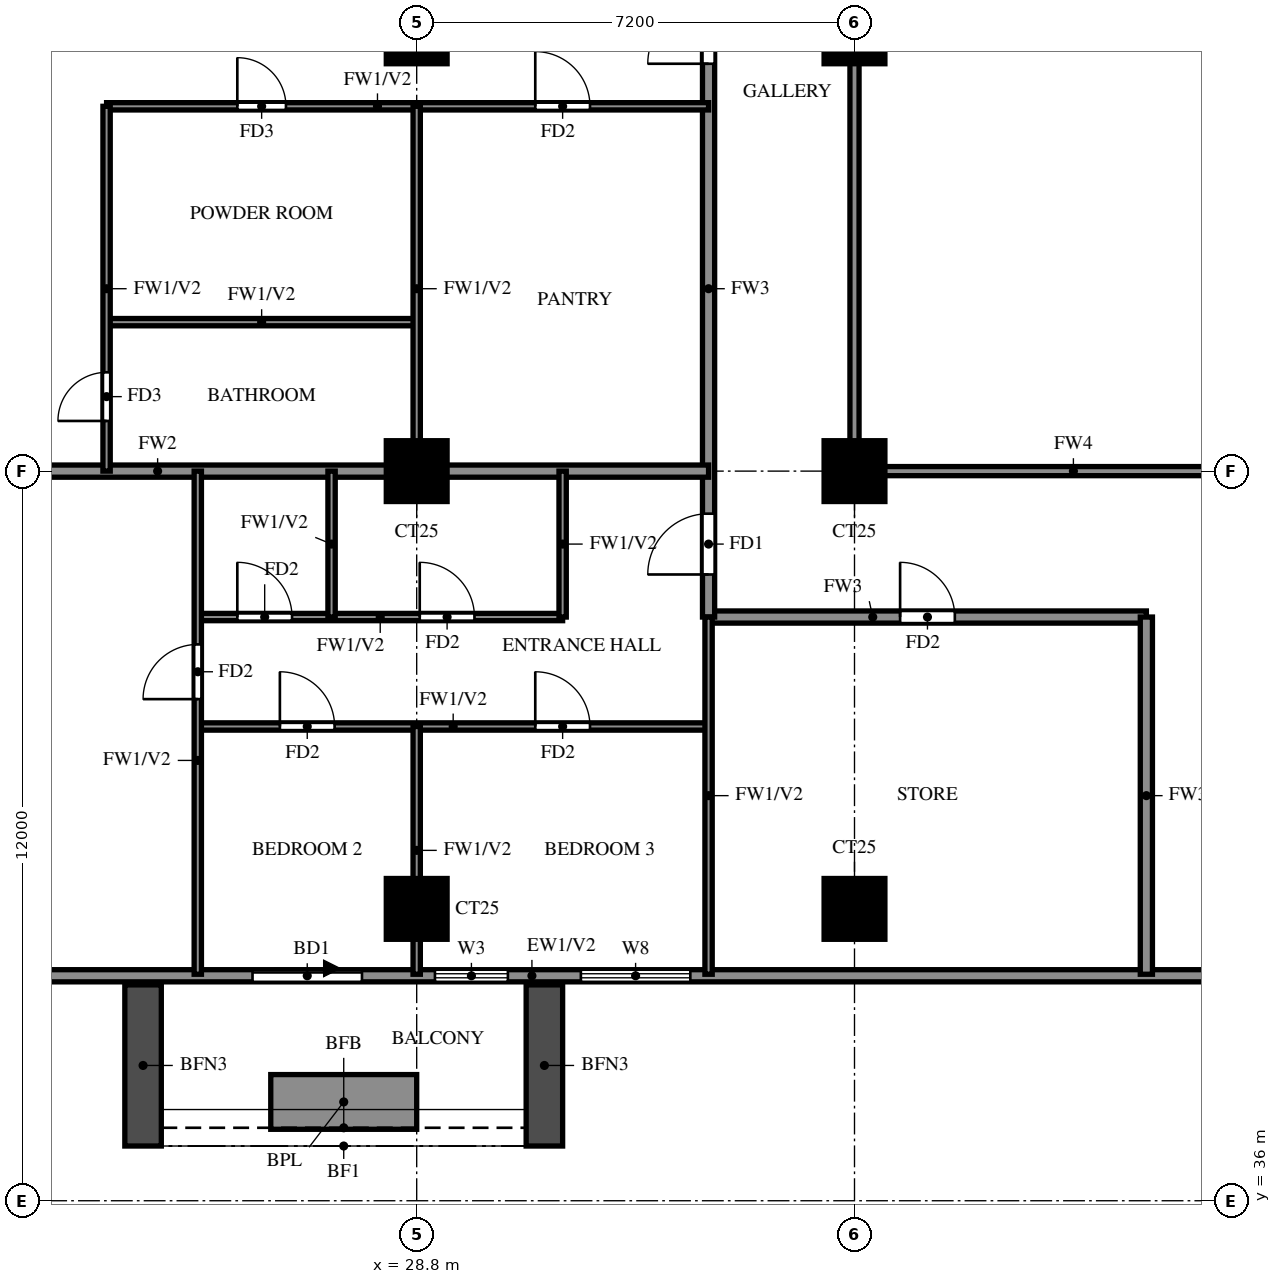
"""IFC4 building model, lengths in metres.
Left out: names, types, materials, properties, quantities, classifications, styles, units other than length and angle.
Written with IfcOpenShell. Run it as: python <this file> out.ifc"""

import sys

from ifc_helpers import new_model, si_unit, direction, frame, frame_2d, origin, origin_2d, place, context, subcontext, project, spatial, rectangle, extrude, source, transform, mapped, element, fill, save


model = new_model("IFC4")
c1 = context("Model", 3, precision=1e-05, world=origin(), true_north=direction((0.0, 1.0)))
c2 = subcontext(c1, "Body", "Model", "MODEL_VIEW")
j1 = project(units=[si_unit("LENGTHUNIT", "METRE"), si_unit("PLANEANGLEUNIT", "RADIAN")], contexts=[c1])
p1 = place(None, origin())
s1 = spatial("IfcSite", under=j1, at=p1, CompositionType="ELEMENT")
p2 = place(p1, origin())
s2 = spatial("IfcBuilding", under=s1, at=p2, CompositionType="ELEMENT")
p3 = place(p2, frame((0.0, 0.0, 164.0)))
s3 = spatial("IfcBuildingStorey", under=s2, at=p3, CompositionType="ELEMENT", Elevation=164.0)
m1 = source(origin(), c2, "Body", "SweptSolid", [
    extrude(rectangle(XDim=1.0, YDim=1.0, at=origin_2d()), origin(), (0.0, 0.0, 1.0), 3.2),
])
for number, where, z_axis, x_axis in (
    (1, (28.8, 40.8, 0.0), (0.0, 0.0, 1.0), (1.0, 0.0, 0.0)),
    (2, (36.0, 40.8, 0.0), (0.0, 0.0, 1.0), (1.0, 0.0, 0.0)),
    (3, (28.8, 48.0, 0.0), (0.0, 0.0, 1.0), (1.0, 0.0, 0.0)),
    (4, (36.0, 48.0, 0.0), (0.0, 0.0, 1.0), (1.0, 0.0, 0.0)),
    (5, (28.8, 55.2, 0.0), (0.0, 0.0, 1.0), (1.0, 0.0, 0.0)),
    (6, (36.0, 55.2, 0.0), (0.0, 0.0, 1.0), (1.0, 0.0, 0.0)),
):
    element("IfcColumn", number, at=place(p3, frame(where, z_axis=z_axis, x_axis=x_axis)), inside=s3, PredefinedType="COLUMN", context=c2, shape_type="MappedRepresentation", body=[
        mapped(m1, transform((0.0, 0.0, 0.0))),
    ])
p4 = place(p3, frame((18.2, 39.7, 0.0), z_axis=(0.0, 0.0, 1.0), x_axis=(1.0, 0.0, 0.0)))
e7 = element("IfcWall", 7, at=p4, inside=s3, PredefinedType="SOLIDWALL", context=c2, shape_type="SweptSolid", body=[
    extrude(rectangle(XDim=23.8, YDim=0.2, at=frame_2d((11.9, 0.0))), origin(), (0.0, 0.0, 1.0), 3.2),
])
p5 = place(p4, frame((7.9, 0.0, 0.0)))
e8 = element("IfcOpeningElement", 8, at=p5, cuts=e7, PredefinedType="OPENING", context=c2, shape_type="SweptSolid", body=[
    extrude(rectangle(XDim=1.8, YDim=2.4, at=frame_2d((0.9, 1.2))), frame((0.0, 0.11, 0.0), z_axis=(0.0, -1.0, 0.0), x_axis=(1.0, 0.0, 0.0)), (0.0, 0.0, 1.0), 0.22),
])
p6 = place(p4, frame((1.8, 0.0, 0.6)))
e9 = element("IfcOpeningElement", 9, at=p6, cuts=e7, PredefinedType="OPENING", context=c2, shape_type="SweptSolid", body=[
    extrude(rectangle(XDim=2.4, YDim=2.4, at=frame_2d((1.2, 1.2))), frame((0.0, 0.11, 0.0), z_axis=(0.0, -1.0, 0.0), x_axis=(1.0, 0.0, 0.0)), (0.0, 0.0, 1.0), 0.22),
])
p7 = place(p4, frame((10.9, 0.0, 0.6)))
e10 = element("IfcOpeningElement", 10, at=p7, cuts=e7, PredefinedType="OPENING", context=c2, shape_type="SweptSolid", body=[
    extrude(rectangle(XDim=1.2, YDim=2.4, at=frame_2d((0.6, 1.2))), frame((0.0, 0.11, 0.0), z_axis=(0.0, -1.0, 0.0), x_axis=(1.0, 0.0, 0.0)), (0.0, 0.0, 1.0), 0.22),
])
p8 = place(p4, frame((13.3, 0.0, 0.6)))
e11 = element("IfcOpeningElement", 11, at=p8, cuts=e7, PredefinedType="OPENING", context=c2, shape_type="SweptSolid", body=[
    extrude(rectangle(XDim=1.8, YDim=2.4, at=frame_2d((0.9, 1.2))), frame((0.0, 0.11, 0.0), z_axis=(0.0, -1.0, 0.0), x_axis=(1.0, 0.0, 0.0)), (0.0, 0.0, 1.0), 0.22),
])
for number, where, z_axis, x_axis in (
    (12, (24.3, 39.55, 0.0), (0.0, 0.0, 1.0), (0.0, -1.0, 0.0)),
    (13, (30.9, 39.55, 0.0), (0.0, 0.0, 1.0), (0.0, -1.0, 0.0)),
):
    element("IfcWall", number, at=place(p3, frame(where, z_axis=z_axis, x_axis=x_axis)), inside=s3, PredefinedType="SOLIDWALL", context=c2, shape_type="SweptSolid", body=[
        extrude(rectangle(XDim=2.65, YDim=0.6, at=frame_2d((1.325, 0.0))), origin(), (0.0, 0.0, 1.0), 2.85),
    ])
p9 = place(p3, frame((26.4, 37.625, 0.0), z_axis=(0.0, 0.0, 1.0), x_axis=(1.0, 0.0, 0.0)))
e14 = element("IfcWall", 14, at=p9, inside=s3, PredefinedType="SOLIDWALL", context=c2, shape_type="SweptSolid", body=[
    extrude(rectangle(XDim=2.4, YDim=0.9, at=frame_2d((1.2, 0.0))), origin(), (0.0, 0.0, 1.0), 0.9),
])
p10 = place(p3, frame((33.6, 45.6, 0.0), z_axis=(0.0, 0.0, 1.0), x_axis=(1.0, 0.0, 0.0)))
e15 = element("IfcWall", 15, at=p10, inside=s3, PredefinedType="SOLIDWALL", context=c2, shape_type="SweptSolid", body=[
    extrude(rectangle(XDim=7.2, YDim=0.2, at=frame_2d((3.6, 0.0))), origin(), (0.0, 0.0, 1.0), 3.2),
])
p11 = place(p10, frame((3.15, 0.0, 0.0)))
e16 = element("IfcOpeningElement", 16, at=p11, cuts=e15, PredefinedType="OPENING", context=c2, shape_type="SweptSolid", body=[
    extrude(rectangle(XDim=0.9, YDim=2.1, at=frame_2d((0.45, 1.05))), frame((0.0, 0.11, 0.0), z_axis=(0.0, -1.0, 0.0), x_axis=(1.0, 0.0, 0.0)), (0.0, 0.0, 1.0), 0.22),
])
p12 = place(p3, frame((33.6, 45.6, 0.0), z_axis=(0.0, 0.0, 1.0), x_axis=(0.0, 1.0, 0.0)))
e17 = element("IfcWall", 17, at=p12, inside=s3, PredefinedType="SOLIDWALL", context=c2, shape_type="SweptSolid", body=[
    extrude(rectangle(XDim=10.8, YDim=0.2, at=frame_2d((5.4, 0.0))), origin(), (0.0, 0.0, 1.0), 3.2),
])
p13 = place(p12, frame((0.7, 0.0, 0.0)))
e18 = element("IfcOpeningElement", 18, at=p13, cuts=e17, PredefinedType="OPENING", context=c2, shape_type="SweptSolid", body=[
    extrude(rectangle(XDim=1.0, YDim=2.1, at=frame_2d((0.5, 1.05))), frame((0.0, 0.11, 0.0), z_axis=(0.0, -1.0, 0.0), x_axis=(1.0, 0.0, 0.0)), (0.0, 0.0, 1.0), 0.22),
])
p14 = place(p12, frame((9.1, 0.0, 0.0)))
e19 = element("IfcOpeningElement", 19, at=p14, cuts=e17, PredefinedType="OPENING", context=c2, shape_type="SweptSolid", body=[
    extrude(rectangle(XDim=1.0, YDim=2.1, at=frame_2d((0.5, 1.05))), frame((0.0, 0.11, 0.0), z_axis=(0.0, -1.0, 0.0), x_axis=(1.0, 0.0, 0.0)), (0.0, 0.0, 1.0), 0.22),
])
p15 = place(p3, frame((40.8, 39.725, 0.0), z_axis=(0.0, 0.0, 1.0), x_axis=(0.0, 1.0, 0.0)))
e20 = element("IfcWall", 20, at=p15, inside=s3, PredefinedType="SOLIDWALL", context=c2, shape_type="SweptSolid", body=[
    extrude(rectangle(XDim=5.875, YDim=0.2, at=frame_2d((2.938, 0.0))), origin(), (0.0, 0.0, 1.0), 3.2),
])
p16 = place(p3, frame((14.525, 48.0, 0.0), z_axis=(0.0, 0.0, 1.0), x_axis=(1.0, 0.0, 0.0)))
e21 = element("IfcWall", 21, at=p16, inside=s3, PredefinedType="SOLIDWALL", context=c2, shape_type="SweptSolid", body=[
    extrude(rectangle(XDim=19.075, YDim=0.2, at=frame_2d((9.538, 0.0))), origin(), (0.0, 0.0, 1.0), 3.2),
])
p17 = place(p3, frame((25.2, 43.8, 0.0), z_axis=(0.0, 0.0, 1.0), x_axis=(1.0, 0.0, 0.0)))
e22 = element("IfcWall", 22, at=p17, inside=s3, PredefinedType="PARTITIONING", context=c2, shape_type="SweptSolid", body=[
    extrude(rectangle(XDim=8.4, YDim=0.12, at=frame_2d((4.2, 0.0))), origin(), (0.0, 0.0, 1.0), 3.2),
])
p18 = place(p17, frame((1.35, 0.0, 0.0)))
e23 = element("IfcOpeningElement", 23, at=p18, cuts=e22, PredefinedType="OPENING", context=c2, shape_type="SweptSolid", body=[
    extrude(rectangle(XDim=0.9, YDim=2.1, at=frame_2d((0.45, 1.05))), frame((0.0, 0.07, 0.0), z_axis=(0.0, -1.0, 0.0), x_axis=(1.0, 0.0, 0.0)), (0.0, 0.0, 1.0), 0.14),
])
p19 = place(p17, frame((5.55, 0.0, 0.0)))
e24 = element("IfcOpeningElement", 24, at=p19, cuts=e22, PredefinedType="OPENING", context=c2, shape_type="SweptSolid", body=[
    extrude(rectangle(XDim=0.9, YDim=2.1, at=frame_2d((0.45, 1.05))), frame((0.0, 0.07, 0.0), z_axis=(0.0, -1.0, 0.0), x_axis=(1.0, 0.0, 0.0)), (0.0, 0.0, 1.0), 0.14),
])
p20 = place(p3, frame((25.2, 45.6, 0.0), z_axis=(0.0, 0.0, 1.0), x_axis=(1.0, 0.0, 0.0)))
e25 = element("IfcWall", 25, at=p20, inside=s3, PredefinedType="PARTITIONING", context=c2, shape_type="SweptSolid", body=[
    extrude(rectangle(XDim=6.0, YDim=0.12, at=frame_2d((3.0, 0.0))), origin(), (0.0, 0.0, 1.0), 3.2),
])
p21 = place(p20, frame((0.65, 0.0, 0.0)))
e26 = element("IfcOpeningElement", 26, at=p21, cuts=e25, PredefinedType="OPENING", context=c2, shape_type="SweptSolid", body=[
    extrude(rectangle(XDim=0.9, YDim=2.1, at=frame_2d((0.45, 1.05))), frame((0.0, 0.07, 0.0), z_axis=(0.0, -1.0, 0.0), x_axis=(1.0, 0.0, 0.0)), (0.0, 0.0, 1.0), 0.14),
])
p22 = place(p20, frame((3.65, 0.0, 0.0)))
e27 = element("IfcOpeningElement", 27, at=p22, cuts=e25, PredefinedType="OPENING", context=c2, shape_type="SweptSolid", body=[
    extrude(rectangle(XDim=0.9, YDim=2.1, at=frame_2d((0.45, 1.05))), frame((0.0, 0.07, 0.0), z_axis=(0.0, -1.0, 0.0), x_axis=(1.0, 0.0, 0.0)), (0.0, 0.0, 1.0), 0.14),
])
p23 = place(p3, frame((23.7, 50.45, 0.0), z_axis=(0.0, 0.0, 1.0), x_axis=(1.0, 0.0, 0.0)))
e28 = element("IfcWall", 28, at=p23, inside=s3, PredefinedType="PARTITIONING", context=c2, shape_type="SweptSolid", body=[
    extrude(rectangle(XDim=5.1, YDim=0.12, at=frame_2d((2.55, 0.0))), origin(), (0.0, 0.0, 1.0), 3.2),
])
p24 = place(p3, frame((23.7, 54.0, 0.0), z_axis=(0.0, 0.0, 1.0), x_axis=(1.0, 0.0, 0.0)))
e29 = element("IfcWall", 29, at=p24, inside=s3, PredefinedType="PARTITIONING", context=c2, shape_type="SweptSolid", body=[
    extrude(rectangle(XDim=9.9, YDim=0.12, at=frame_2d((4.95, 0.0))), origin(), (0.0, 0.0, 1.0), 3.2),
])
p25 = place(p24, frame((2.15, 0.0, 0.0)))
e30 = element("IfcOpeningElement", 30, at=p25, cuts=e29, PredefinedType="OPENING", context=c2, shape_type="SweptSolid", body=[
    extrude(rectangle(XDim=0.8, YDim=2.1, at=frame_2d((0.4, 1.05))), frame((0.0, 0.07, 0.0), z_axis=(0.0, -1.0, 0.0), x_axis=(1.0, 0.0, 0.0)), (0.0, 0.0, 1.0), 0.14),
])
p26 = place(p24, frame((7.05, 0.0, 0.0)))
e31 = element("IfcOpeningElement", 31, at=p26, cuts=e29, PredefinedType="OPENING", context=c2, shape_type="SweptSolid", body=[
    extrude(rectangle(XDim=0.9, YDim=2.1, at=frame_2d((0.45, 1.05))), frame((0.0, 0.07, 0.0), z_axis=(0.0, -1.0, 0.0), x_axis=(1.0, 0.0, 0.0)), (0.0, 0.0, 1.0), 0.14),
])
p27 = place(p3, frame((23.7, 48.0, 0.0), z_axis=(0.0, 0.0, 1.0), x_axis=(0.0, 1.0, 0.0)))
e32 = element("IfcWall", 32, at=p27, inside=s3, PredefinedType="PARTITIONING", context=c2, shape_type="SweptSolid", body=[
    extrude(rectangle(XDim=6.0, YDim=0.12, at=frame_2d((3.0, 0.0))), origin(), (0.0, 0.0, 1.0), 3.2),
])
p28 = place(p27, frame((0.825, 0.0, 0.0)))
e33 = element("IfcOpeningElement", 33, at=p28, cuts=e32, PredefinedType="OPENING", context=c2, shape_type="SweptSolid", body=[
    extrude(rectangle(XDim=0.8, YDim=2.1, at=frame_2d((0.4, 1.05))), frame((0.0, 0.07, 0.0), z_axis=(0.0, -1.0, 0.0), x_axis=(1.0, 0.0, 0.0)), (0.0, 0.0, 1.0), 0.14),
])
p29 = place(p3, frame((25.2, 39.725, 0.0), z_axis=(0.0, 0.0, 1.0), x_axis=(0.0, 1.0, 0.0)))
e34 = element("IfcWall", 34, at=p29, inside=s3, PredefinedType="PARTITIONING", context=c2, shape_type="SweptSolid", body=[
    extrude(rectangle(XDim=8.275, YDim=0.12, at=frame_2d((4.137, 0.0))), origin(), (0.0, 0.0, 1.0), 3.2),
])
p30 = place(p29, frame((4.525, 0.0, 0.0)))
e35 = element("IfcOpeningElement", 35, at=p30, cuts=e34, PredefinedType="OPENING", context=c2, shape_type="SweptSolid", body=[
    extrude(rectangle(XDim=0.9, YDim=2.1, at=frame_2d((0.45, 1.05))), frame((0.0, 0.07, 0.0), z_axis=(0.0, -1.0, 0.0), x_axis=(1.0, 0.0, 0.0)), (0.0, 0.0, 1.0), 0.14),
])
p31 = place(p3, frame((27.4, 45.6, 0.0), z_axis=(0.0, 0.0, 1.0), x_axis=(0.0, 1.0, 0.0)))
e36 = element("IfcWall", 36, at=p31, inside=s3, PredefinedType="PARTITIONING", context=c2, shape_type="SweptSolid", body=[
    extrude(rectangle(XDim=2.4, YDim=0.12, at=frame_2d((1.2, 0.0))), origin(), (0.0, 0.0, 1.0), 3.2),
])
p32 = place(p3, frame((28.8, 39.725, 0.0), z_axis=(0.0, 0.0, 1.0), x_axis=(0.0, 1.0, 0.0)))
e37 = element("IfcWall", 37, at=p32, inside=s3, PredefinedType="PARTITIONING", context=c2, shape_type="SweptSolid", body=[
    extrude(rectangle(XDim=4.075, YDim=0.12, at=frame_2d((2.038, 0.0))), origin(), (0.0, 0.0, 1.0), 3.2),
])
p33 = place(p3, frame((28.8, 48.0, 0.0), z_axis=(0.0, 0.0, 1.0), x_axis=(0.0, 1.0, 0.0)))
e38 = element("IfcWall", 38, at=p33, inside=s3, PredefinedType="PARTITIONING", context=c2, shape_type="SweptSolid", body=[
    extrude(rectangle(XDim=6.0, YDim=0.12, at=frame_2d((3.0, 0.0))), origin(), (0.0, 0.0, 1.0), 3.2),
])
p34 = place(p3, frame((31.2, 45.6, 0.0), z_axis=(0.0, 0.0, 1.0), x_axis=(0.0, 1.0, 0.0)))
e39 = element("IfcWall", 39, at=p34, inside=s3, PredefinedType="PARTITIONING", context=c2, shape_type="SweptSolid", body=[
    extrude(rectangle(XDim=2.4, YDim=0.12, at=frame_2d((1.2, 0.0))), origin(), (0.0, 0.0, 1.0), 3.2),
])
p35 = place(p3, frame((33.6, 39.725, 0.0), z_axis=(0.0, 0.0, 1.0), x_axis=(0.0, 1.0, 0.0)))
e40 = element("IfcWall", 40, at=p35, inside=s3, PredefinedType="PARTITIONING", context=c2, shape_type="SweptSolid", body=[
    extrude(rectangle(XDim=5.875, YDim=0.12, at=frame_2d((2.938, 0.0))), origin(), (0.0, 0.0, 1.0), 3.2),
])
p36 = place(p3, frame((36.0, 48.0, 0.0), z_axis=(0.0, 0.0, 1.0), x_axis=(1.0, 0.0, 0.0)))
e41 = element("IfcWall", 41, at=p36, inside=s3, PredefinedType="SOLIDWALL", context=c2, shape_type="SweptSolid", body=[
    extrude(rectangle(XDim=7.2, YDim=0.15, at=frame_2d((3.6, 0.0))), origin(), (0.0, 0.0, 1.0), 2.3),
])
p37 = place(p3, frame((36.0, 48.0, 0.0), z_axis=(0.0, 0.0, 1.0), x_axis=(0.0, 1.0, 0.0)))
e42 = element("IfcWall", 42, at=p37, inside=s3, PredefinedType="SOLIDWALL", context=c2, shape_type="SweptSolid", body=[
    extrude(rectangle(XDim=14.4, YDim=0.15, at=frame_2d((7.2, 0.0))), origin(), (0.0, 0.0, 1.0), 2.3),
])
p38 = place(p5, origin())
e43 = element("IfcDoor", 43, at=p38, inside=s3, OperationType="DOUBLE_DOOR_SLIDING", PredefinedType="DOOR", context=c2, shape_type="SweptSolid", body=[
    extrude(rectangle(XDim=1.8, YDim=2.4, at=frame_2d((0.9, 1.2))), frame((0.0, 0.025, 0.0), z_axis=(0.0, -1.0, 0.0), x_axis=(1.0, 0.0, 0.0)), (0.0, 0.0, 1.0), 0.05),
])
fill(e8, e43)
p39 = place(p7, origin())
e44 = element("IfcWindow", 44, at=p39, inside=s3, PartitioningType="SINGLE_PANEL", PredefinedType="WINDOW", context=c2, shape_type="SweptSolid", body=[
    extrude(rectangle(XDim=1.2, YDim=2.4, at=frame_2d((0.6, 1.2))), frame((0.0, 0.03, 0.0), z_axis=(0.0, -1.0, 0.0), x_axis=(1.0, 0.0, 0.0)), (0.0, 0.0, 1.0), 0.06),
])
fill(e10, e44)
p40 = place(p8, origin())
e45 = element("IfcWindow", 45, at=p40, inside=s3, PartitioningType="DOUBLE_PANEL_VERTICAL", PredefinedType="WINDOW", context=c2, shape_type="SweptSolid", body=[
    extrude(rectangle(XDim=1.8, YDim=2.4, at=frame_2d((0.9, 1.2))), frame((0.0, 0.03, 0.0), z_axis=(0.0, -1.0, 0.0), x_axis=(1.0, 0.0, 0.0)), (0.0, 0.0, 1.0), 0.06),
])
fill(e11, e45)
p41 = place(p13, origin())
e46 = element("IfcDoor", 46, at=p41, inside=s3, OperationType="SINGLE_SWING_LEFT", PredefinedType="DOOR", context=c2, shape_type="SweptSolid", body=[
    extrude(rectangle(XDim=1.0, YDim=2.1, at=frame_2d((0.5, 1.05))), frame((0.0, 0.025, 0.0), z_axis=(0.0, -1.0, 0.0), x_axis=(1.0, 0.0, 0.0)), (0.0, 0.0, 1.0), 0.05),
])
fill(e18, e46)
p42 = place(p30, origin())
e47 = element("IfcDoor", 47, at=p42, inside=s3, OperationType="SINGLE_SWING_LEFT", PredefinedType="DOOR", context=c2, shape_type="SweptSolid", body=[
    extrude(rectangle(XDim=0.9, YDim=2.1, at=frame_2d((0.45, 1.05))), frame((0.0, 0.025, 0.0), z_axis=(0.0, -1.0, 0.0), x_axis=(1.0, 0.0, 0.0)), (0.0, 0.0, 1.0), 0.05),
])
fill(e35, e47)
p43 = place(p18, origin())
e48 = element("IfcDoor", 48, at=p43, inside=s3, OperationType="SINGLE_SWING_RIGHT", PredefinedType="DOOR", context=c2, shape_type="SweptSolid", body=[
    extrude(rectangle(XDim=0.9, YDim=2.1, at=frame_2d((0.45, 1.05))), frame((0.0, 0.025, 0.0), z_axis=(0.0, -1.0, 0.0), x_axis=(1.0, 0.0, 0.0)), (0.0, 0.0, 1.0), 0.05),
])
fill(e23, e48)
p44 = place(p19, origin())
e49 = element("IfcDoor", 49, at=p44, inside=s3, OperationType="SINGLE_SWING_LEFT", PredefinedType="DOOR", context=c2, shape_type="SweptSolid", body=[
    extrude(rectangle(XDim=0.9, YDim=2.1, at=frame_2d((0.45, 1.05))), frame((0.0, 0.025, 0.0), z_axis=(0.0, -1.0, 0.0), x_axis=(1.0, 0.0, 0.0)), (0.0, 0.0, 1.0), 0.05),
])
fill(e24, e49)
p45 = place(p21, origin())
e50 = element("IfcDoor", 50, at=p45, inside=s3, OperationType="SINGLE_SWING_LEFT", PredefinedType="DOOR", context=c2, shape_type="SweptSolid", body=[
    extrude(rectangle(XDim=0.9, YDim=2.1, at=frame_2d((0.45, 1.05))), frame((0.0, 0.025, 0.0), z_axis=(0.0, -1.0, 0.0), x_axis=(1.0, 0.0, 0.0)), (0.0, 0.0, 1.0), 0.05),
])
fill(e26, e50)
p46 = place(p22, origin())
e51 = element("IfcDoor", 51, at=p46, inside=s3, OperationType="SINGLE_SWING_RIGHT", PredefinedType="DOOR", context=c2, shape_type="SweptSolid", body=[
    extrude(rectangle(XDim=0.9, YDim=2.1, at=frame_2d((0.45, 1.05))), frame((0.0, 0.025, 0.0), z_axis=(0.0, -1.0, 0.0), x_axis=(1.0, 0.0, 0.0)), (0.0, 0.0, 1.0), 0.05),
])
fill(e27, e51)
p47 = place(p11, origin())
e52 = element("IfcDoor", 52, at=p47, inside=s3, OperationType="SINGLE_SWING_LEFT", PredefinedType="DOOR", context=c2, shape_type="SweptSolid", body=[
    extrude(rectangle(XDim=0.9, YDim=2.1, at=frame_2d((0.45, 1.05))), frame((0.0, 0.025, 0.0), z_axis=(0.0, -1.0, 0.0), x_axis=(1.0, 0.0, 0.0)), (0.0, 0.0, 1.0), 0.05),
])
fill(e16, e52)
p48 = place(p14, origin())
e53 = element("IfcDoor", 53, at=p48, inside=s3, OperationType="SINGLE_SWING_LEFT", PredefinedType="DOOR", context=c2, shape_type="SweptSolid", body=[
    extrude(rectangle(XDim=1.0, YDim=2.1, at=frame_2d((0.5, 1.05))), frame((0.0, 0.025, 0.0), z_axis=(0.0, -1.0, 0.0), x_axis=(1.0, 0.0, 0.0)), (0.0, 0.0, 1.0), 0.05),
])
fill(e19, e53)
p49 = place(p28, origin())
e54 = element("IfcDoor", 54, at=p49, inside=s3, OperationType="SINGLE_SWING_RIGHT", PredefinedType="DOOR", context=c2, shape_type="SweptSolid", body=[
    extrude(rectangle(XDim=0.8, YDim=2.1, at=frame_2d((0.4, 1.05))), frame((0.0, 0.025, 0.0), z_axis=(0.0, -1.0, 0.0), x_axis=(1.0, 0.0, 0.0)), (0.0, 0.0, 1.0), 0.05),
])
fill(e33, e54)
p50 = place(p25, origin())
e55 = element("IfcDoor", 55, at=p50, inside=s3, OperationType="SINGLE_SWING_LEFT", PredefinedType="DOOR", context=c2, shape_type="SweptSolid", body=[
    extrude(rectangle(XDim=0.8, YDim=2.1, at=frame_2d((0.4, 1.05))), frame((0.0, 0.025, 0.0), z_axis=(0.0, -1.0, 0.0), x_axis=(1.0, 0.0, 0.0)), (0.0, 0.0, 1.0), 0.05),
])
fill(e30, e55)
p51 = place(p26, origin())
e56 = element("IfcDoor", 56, at=p51, inside=s3, OperationType="SINGLE_SWING_RIGHT", PredefinedType="DOOR", context=c2, shape_type="SweptSolid", body=[
    extrude(rectangle(XDim=0.9, YDim=2.1, at=frame_2d((0.45, 1.05))), frame((0.0, 0.025, 0.0), z_axis=(0.0, -1.0, 0.0), x_axis=(1.0, 0.0, 0.0)), (0.0, 0.0, 1.0), 0.05),
])
fill(e31, e56)
save(model, sys.argv[1])
